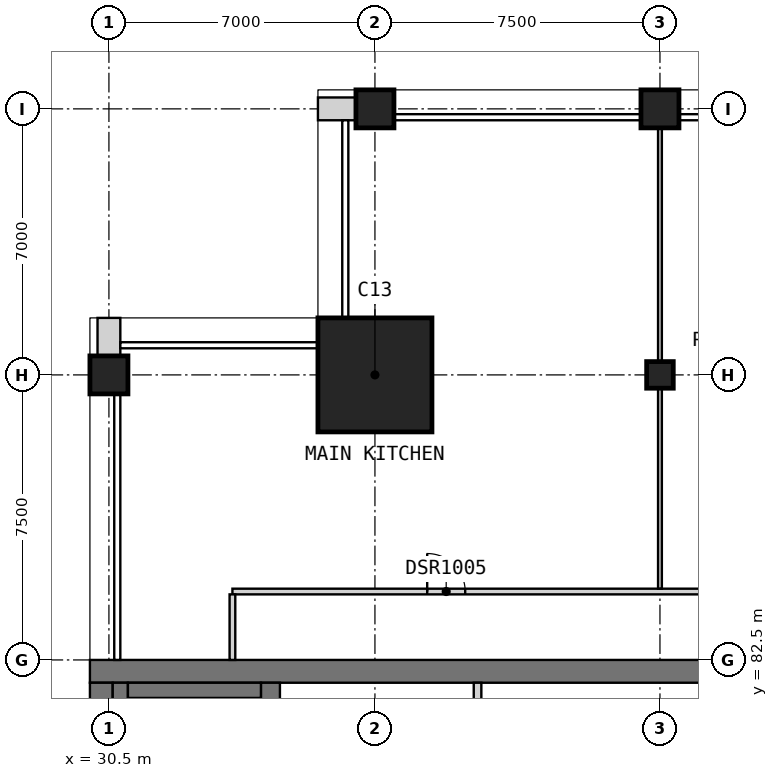
"""IFC4 building model, lengths in metres.
Left out: names, types, materials, properties, quantities, classifications, styles, units other than length and angle.
Written with IfcOpenShell. Run it as: python <this file> out.ifc"""

import sys

from ifc_helpers import new_model, si_unit, direction, frame, frame_2d, origin, origin_2d, place, context, subcontext, project, spatial, rectangle, extrude, element, fill, save


model = new_model("IFC4")
c1 = context("Model", 3, precision=1e-05, world=origin(), true_north=direction((0.0, 1.0)))
c2 = subcontext(c1, "Body", "Model", "MODEL_VIEW")
j1 = project(units=[si_unit("LENGTHUNIT", "METRE"), si_unit("PLANEANGLEUNIT", "RADIAN")], contexts=[c1])
p1 = place(None, origin())
s1 = spatial("IfcSite", under=j1, at=p1, CompositionType="ELEMENT")
p2 = place(p1, origin())
s2 = spatial("IfcBuilding", under=s1, at=p2, CompositionType="ELEMENT")
p3 = place(p2, frame((0.0, 0.0, 292.2)))
s3 = spatial("IfcBuildingStorey", under=s2, at=p3, CompositionType="ELEMENT", Elevation=292.2)
for number, where, z_axis, x_axis in (
    (1, (30.5, 90.0, 0.0), (0.0, 0.0, 1.0), (1.0, 0.0, 0.0)),
    (2, (37.5, 97.0, 0.0), (0.0, 0.0, 1.0), (1.0, 0.0, 0.0)),
):
    element("IfcColumn", number, at=place(p3, frame(where, z_axis=z_axis, x_axis=x_axis)), inside=s3, PredefinedType="COLUMN", context=c2, shape_type="SweptSolid", body=[
        extrude(rectangle(XDim=1.0, YDim=1.0, at=origin_2d()), origin(), (0.0, 0.0, 1.0), 5.5),
    ])
p4 = place(p3, frame((45.0, 90.0, 0.0), z_axis=(0.0, 0.0, 1.0), x_axis=(1.0, 0.0, 0.0)))
e3 = element("IfcColumn", 3, at=p4, inside=s3, PredefinedType="COLUMN", context=c2, shape_type="SweptSolid", body=[
    extrude(rectangle(XDim=0.7, YDim=0.7, at=origin_2d()), origin(), (0.0, 0.0, 1.0), 5.5),
])
p5 = place(p3, frame((45.0, 97.0, 0.0), z_axis=(0.0, 0.0, 1.0), x_axis=(1.0, 0.0, 0.0)))
e4 = element("IfcColumn", 4, at=p5, inside=s3, PredefinedType="COLUMN", context=c2, shape_type="SweptSolid", body=[
    extrude(rectangle(XDim=1.0, YDim=1.0, at=origin_2d()), origin(), (0.0, 0.0, 1.0), 5.5),
])
p6 = place(p3, frame((37.5, 90.0, 0.0), z_axis=(0.0, 0.0, 1.0), x_axis=(1.0, 0.0, 0.0)))
e5 = element("IfcColumn", 5, at=p6, inside=s3, PredefinedType="COLUMN", context=c2, shape_type="SweptSolid", body=[
    extrude(rectangle(XDim=3.0, YDim=3.0, at=origin_2d()), origin(), (0.0, 0.0, 1.0), 5.5),
])
p7 = place(p3, frame((30.0, 82.2, 0.0), z_axis=(0.0, 0.0, 1.0), x_axis=(1.0, 0.0, 0.0)))
e6 = element("IfcWall", 6, at=p7, inside=s3, PredefinedType="SHEAR", context=c2, shape_type="SweptSolid", body=[
    extrude(rectangle(XDim=30.0, YDim=0.6, at=frame_2d((15.0, 0.0))), origin(), (0.0, 0.0, 1.0), 5.5),
])
p8 = place(p3, frame((30.3, 60.6, 0.0), z_axis=(0.0, 0.0, 1.0), x_axis=(0.0, 1.0, 0.0)))
e7 = element("IfcWall", 7, at=p8, inside=s3, PredefinedType="SHEAR", context=c2, shape_type="SweptSolid", body=[
    extrude(rectangle(XDim=21.3, YDim=0.6, at=frame_2d((10.65, 0.0))), origin(), (0.0, 0.0, 1.0), 5.5),
])
p9 = place(p3, frame((34.75, 78.3, 0.0), z_axis=(0.0, 0.0, 1.0), x_axis=(0.0, 1.0, 0.0)))
e8 = element("IfcWall", 8, at=p9, inside=s3, PredefinedType="SHEAR", context=c2, shape_type="SweptSolid", body=[
    extrude(rectangle(XDim=3.6, YDim=0.5, at=frame_2d((1.8, 0.0))), origin(), (0.0, 0.0, 1.0), 5.5),
])
for number, where, z_axis, x_axis in (
    (9, (37.0, 97.0, 0.0), (0.0, 0.0, 1.0), (-1.0, 0.0, 0.0)),
    (10, (30.5, 91.5, 0.0), (0.0, 0.0, 1.0), (0.0, -1.0, 0.0)),
):
    element("IfcWall", number, at=place(p3, frame(where, z_axis=z_axis, x_axis=x_axis)), inside=s3, PredefinedType="SOLIDWALL", context=c2, shape_type="SweptSolid", body=[
        extrude(rectangle(XDim=1.0, YDim=0.6, at=frame_2d((0.5, 0.0))), origin(), (0.0, 0.0, 1.0), 5.2),
    ])
p10 = place(p3, frame((40.2, 78.5, 0.0), z_axis=(0.0, 0.0, 1.0), x_axis=(0.0, 1.0, 0.0)))
e11 = element("IfcWall", 11, at=p10, inside=s3, PredefinedType="SOLIDWALL", context=c2, shape_type="SweptSolid", body=[
    extrude(rectangle(XDim=3.4, YDim=0.2, at=frame_2d((1.7, 0.0))), origin(), (0.0, 0.0, 1.0), 5.5),
])
p11 = place(p3, frame((30.8, 60.6, 0.0), z_axis=(0.0, 0.0, 1.0), x_axis=(0.0, 1.0, 0.0)))
e12 = element("IfcWall", 12, at=p11, inside=s3, PredefinedType="SOLIDWALL", context=c2, shape_type="SweptSolid", body=[
    extrude(rectangle(XDim=21.3, YDim=0.4, at=frame_2d((10.65, 0.0))), origin(), (0.0, 0.0, 1.0), 5.2),
])
p12 = place(p3, frame((31.0, 81.7, 0.0), z_axis=(0.0, 0.0, 1.0), x_axis=(1.0, 0.0, 0.0)))
e13 = element("IfcWall", 13, at=p12, inside=s3, PredefinedType="SOLIDWALL", context=c2, shape_type="SweptSolid", body=[
    extrude(rectangle(XDim=3.5, YDim=0.4, at=frame_2d((1.75, 0.0))), origin(), (0.0, 0.0, 1.0), 5.2),
])
p13 = place(p3, frame((33.75, 84.3, 0.0), z_axis=(0.0, 0.0, 1.0), x_axis=(1.0, 0.0, 0.0)))
e14 = element("IfcWall", 14, at=p13, inside=s3, PredefinedType="PARTITIONING", context=c2, shape_type="SweptSolid", body=[
    extrude(rectangle(XDim=28.05, YDim=0.15, at=frame_2d((14.025, 0.0))), origin(), (0.0, 0.0, 1.0), 5.2),
])
p14 = place(p13, frame((5.125, 0.0, 0.0)))
e15 = element("IfcOpeningElement", 15, at=p14, cuts=e14, PredefinedType="OPENING", context=c2, shape_type="SweptSolid", body=[
    extrude(rectangle(XDim=1.0, YDim=2.1, at=frame_2d((0.5, 1.05))), frame((0.0, 0.085, 0.0), z_axis=(0.0, -1.0, 0.0), x_axis=(1.0, 0.0, 0.0)), (0.0, 0.0, 1.0), 0.17),
])
p15 = place(p13, frame((14.5, 0.0, 0.0)))
e16 = element("IfcOpeningElement", 16, at=p15, cuts=e14, PredefinedType="OPENING", context=c2, shape_type="SweptSolid", body=[
    extrude(rectangle(XDim=1.0, YDim=2.1, at=frame_2d((0.5, 1.05))), frame((0.0, 0.085, 0.0), z_axis=(0.0, -1.0, 0.0), x_axis=(1.0, 0.0, 0.0)), (0.0, 0.0, 1.0), 0.17),
])
p16 = place(p13, frame((21.6, 0.0, 0.0)))
e17 = element("IfcOpeningElement", 17, at=p16, cuts=e14, PredefinedType="OPENING", context=c2, shape_type="SweptSolid", body=[
    extrude(rectangle(XDim=1.8, YDim=2.1, at=frame_2d((0.9, 1.05))), frame((0.0, 0.085, 0.0), z_axis=(0.0, -1.0, 0.0), x_axis=(1.0, 0.0, 0.0)), (0.0, 0.0, 1.0), 0.17),
])
p17 = place(p13, frame((26.65, 0.0, 0.0)))
e18 = element("IfcOpeningElement", 18, at=p17, cuts=e14, PredefinedType="OPENING", context=c2, shape_type="SweptSolid", body=[
    extrude(rectangle(XDim=1.0, YDim=2.1, at=frame_2d((0.5, 1.05))), frame((0.0, 0.085, 0.0), z_axis=(0.0, -1.0, 0.0), x_axis=(1.0, 0.0, 0.0)), (0.0, 0.0, 1.0), 0.17),
])
p18 = place(p3, frame((33.75, 82.5, 0.0), z_axis=(0.0, 0.0, 1.0), x_axis=(0.0, 1.0, 0.0)))
e19 = element("IfcWall", 19, at=p18, inside=s3, PredefinedType="PARTITIONING", context=c2, shape_type="SweptSolid", body=[
    extrude(rectangle(XDim=1.725, YDim=0.15, at=frame_2d((0.863, 0.0))), origin(), (0.0, 0.0, 1.0), 5.2),
])
p19 = place(p3, frame((45.0, 84.375, 0.0), z_axis=(0.0, 0.0, 1.0), x_axis=(0.0, 1.0, 0.0)))
e20 = element("IfcWall", 20, at=p19, inside=s3, PredefinedType="PARTITIONING", context=c2, shape_type="SweptSolid", body=[
    extrude(rectangle(XDim=13.125, YDim=0.1, at=frame_2d((6.562, 0.0))), origin(), (0.0, 0.0, 1.0), 5.2),
])
p20 = place(p14, origin())
e21 = element("IfcDoor", 21, at=p20, inside=s3, OperationType="SINGLE_SWING_LEFT", PredefinedType="DOOR", context=c2, shape_type="SweptSolid", body=[
    extrude(rectangle(XDim=1.0, YDim=2.1, at=frame_2d((0.5, 1.05))), frame((0.0, 0.025, 0.0), z_axis=(0.0, -1.0, 0.0), x_axis=(1.0, 0.0, 0.0)), (0.0, 0.0, 1.0), 0.05),
])
fill(e15, e21)
save(model, sys.argv[1])
